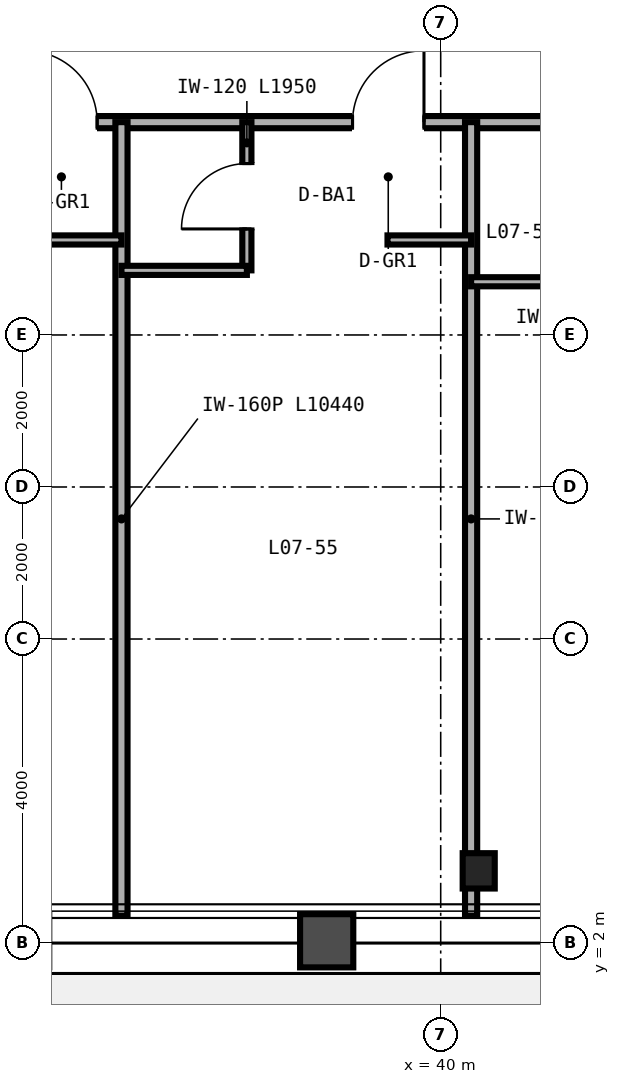
"""IFC4 building model, lengths in metres.
Left out: names, types, materials, properties, quantities, classifications, styles, units other than length and angle.
Written with IfcOpenShell. Run it as: python <this file> out.ifc"""

import sys

from ifc_helpers import new_model, si_unit, direction, frame, frame_2d, origin, origin_2d, place, context, subcontext, project, spatial, rectangle, i_section, extrude, source, transform, mapped, element, fill, save


model = new_model("IFC4")
c1 = context("Model", 3, precision=1e-05, world=origin(), true_north=direction((0.0, 1.0)))
c2 = subcontext(c1, "Body", "Model", "MODEL_VIEW")
j1 = project(units=[si_unit("LENGTHUNIT", "METRE"), si_unit("PLANEANGLEUNIT", "RADIAN")], contexts=[c1])
p1 = place(None, origin())
s1 = spatial("IfcSite", under=j1, at=p1, CompositionType="ELEMENT")
p2 = place(p1, origin())
s2 = spatial("IfcBuilding", under=s1, at=p2, CompositionType="ELEMENT")
p3 = place(p2, frame((0.0, 0.0, 34.8)))
s3 = spatial("IfcBuildingStorey", under=s2, at=p3, CompositionType="ELEMENT", Elevation=34.8)
m1 = source(origin(), c2, "Body", "SweptSolid", [
    extrude(i_section(OverallWidth=0.422, OverallDepth=0.465, WebThickness=0.045, FlangeThickness=0.073, FilletRadius=0.025, at=origin_2d()), origin(), (0.0, 0.0, 1.0), 3.35),
])
p4 = place(p3, frame((40.5, 2.95, 0.0), z_axis=(0.0, 0.0, 1.0), x_axis=(1.0, 0.0, 0.0)))
e1 = element("IfcColumn", 1, at=p4, inside=s3, PredefinedType="COLUMN", context=c2, shape_type="MappedRepresentation", body=[
    mapped(m1, transform((0.0, 0.0, 0.0), scale=1.0)),
])
p5 = place(p3, frame((14.0, 12.8, 0.0), z_axis=(0.0, 0.0, 1.0), x_axis=(1.0, 0.0, 0.0)))
e2 = element("IfcWall", 2, at=p5, inside=s3, PredefinedType="PARTITIONING", context=c2, shape_type="SweptSolid", body=[
    extrude(rectangle(XDim=36.0, YDim=0.16, at=frame_2d((18.0, 0.0))), origin(), (0.0, 0.0, 1.0), 2.571),
])
p6 = place(p5, frame((2.94, 0.0, 0.0)))
e3 = element("IfcOpeningElement", 3, at=p6, cuts=e2, PredefinedType="OPENING", context=c2, shape_type="SweptSolid", body=[
    extrude(rectangle(XDim=0.94, YDim=2.15, at=frame_2d((0.47, 1.075))), frame((0.0, 0.09, 0.0), z_axis=(0.0, -1.0, 0.0), x_axis=(1.0, 0.0, 0.0)), (0.0, 0.0, 1.0), 0.18),
])
p7 = place(p5, frame((7.14, 0.0, 0.0)))
e4 = element("IfcOpeningElement", 4, at=p7, cuts=e2, PredefinedType="OPENING", context=c2, shape_type="SweptSolid", body=[
    extrude(rectangle(XDim=0.94, YDim=2.15, at=frame_2d((0.47, 1.075))), frame((0.0, 0.09, 0.0), z_axis=(0.0, -1.0, 0.0), x_axis=(1.0, 0.0, 0.0)), (0.0, 0.0, 1.0), 0.18),
])
p8 = place(p5, frame((11.54, 0.0, 0.0)))
e5 = element("IfcOpeningElement", 5, at=p8, cuts=e2, PredefinedType="OPENING", context=c2, shape_type="SweptSolid", body=[
    extrude(rectangle(XDim=0.94, YDim=2.15, at=frame_2d((0.47, 1.075))), frame((0.0, 0.09, 0.0), z_axis=(0.0, -1.0, 0.0), x_axis=(1.0, 0.0, 0.0)), (0.0, 0.0, 1.0), 0.18),
])
p9 = place(p5, frame((15.94, 0.0, 0.0)))
e6 = element("IfcOpeningElement", 6, at=p9, cuts=e2, PredefinedType="OPENING", context=c2, shape_type="SweptSolid", body=[
    extrude(rectangle(XDim=0.94, YDim=2.15, at=frame_2d((0.47, 1.075))), frame((0.0, 0.09, 0.0), z_axis=(0.0, -1.0, 0.0), x_axis=(1.0, 0.0, 0.0)), (0.0, 0.0, 1.0), 0.18),
])
p10 = place(p5, frame((20.54, 0.0, 0.0)))
e7 = element("IfcOpeningElement", 7, at=p10, cuts=e2, PredefinedType="OPENING", context=c2, shape_type="SweptSolid", body=[
    extrude(rectangle(XDim=0.94, YDim=2.15, at=frame_2d((0.47, 1.075))), frame((0.0, 0.09, 0.0), z_axis=(0.0, -1.0, 0.0), x_axis=(1.0, 0.0, 0.0)), (0.0, 0.0, 1.0), 0.18),
])
p11 = place(p5, frame((24.84, 0.0, 0.0)))
e8 = element("IfcOpeningElement", 8, at=p11, cuts=e2, PredefinedType="OPENING", context=c2, shape_type="SweptSolid", body=[
    extrude(rectangle(XDim=0.94, YDim=2.15, at=frame_2d((0.47, 1.075))), frame((0.0, 0.09, 0.0), z_axis=(0.0, -1.0, 0.0), x_axis=(1.0, 0.0, 0.0)), (0.0, 0.0, 1.0), 0.18),
])
p12 = place(p5, frame((29.94, 0.0, 0.0)))
e9 = element("IfcOpeningElement", 9, at=p12, cuts=e2, PredefinedType="OPENING", context=c2, shape_type="SweptSolid", body=[
    extrude(rectangle(XDim=0.94, YDim=2.15, at=frame_2d((0.47, 1.075))), frame((0.0, 0.09, 0.0), z_axis=(0.0, -1.0, 0.0), x_axis=(1.0, 0.0, 0.0)), (0.0, 0.0, 1.0), 0.18),
])
p13 = place(p5, frame((34.74, 0.0, 0.0)))
e10 = element("IfcOpeningElement", 10, at=p13, cuts=e2, PredefinedType="OPENING", context=c2, shape_type="SweptSolid", body=[
    extrude(rectangle(XDim=0.94, YDim=2.15, at=frame_2d((0.47, 1.075))), frame((0.0, 0.09, 0.0), z_axis=(0.0, -1.0, 0.0), x_axis=(1.0, 0.0, 0.0)), (0.0, 0.0, 1.0), 0.18),
])
p14 = place(p3, frame((35.8, 2.36, 0.0), z_axis=(0.0, 0.0, 1.0), x_axis=(0.0, 1.0, 0.0)))
e11 = element("IfcWall", 11, at=p14, inside=s3, PredefinedType="PARTITIONING", context=c2, shape_type="SweptSolid", body=[
    extrude(rectangle(XDim=10.44, YDim=0.16, at=frame_2d((5.22, 0.0))), origin(), (0.0, 0.0, 1.0), 2.423),
])
p15 = place(p3, frame((34.7, 11.25, 0.0), z_axis=(0.0, 0.0, 1.0), x_axis=(1.0, 0.0, 0.0)))
e12 = element("IfcWall", 12, at=p15, inside=s3, PredefinedType="PARTITIONING", context=c2, shape_type="SweptSolid", body=[
    extrude(rectangle(XDim=1.1, YDim=0.12, at=frame_2d((0.55, 0.0))), origin(), (0.0, 0.0, 1.0), 3.35),
])
p16 = place(p3, frame((40.4, 2.36, 0.0), z_axis=(0.0, 0.0, 1.0), x_axis=(0.0, 1.0, 0.0)))
e13 = element("IfcWall", 13, at=p16, inside=s3, PredefinedType="PARTITIONING", context=c2, shape_type="SweptSolid", body=[
    extrude(rectangle(XDim=10.44, YDim=0.16, at=frame_2d((5.22, 0.0))), origin(), (0.0, 0.0, 1.0), 2.423),
])
p17 = place(p3, frame((37.45, 10.85, 0.0), z_axis=(0.0, 0.0, 1.0), x_axis=(0.0, 1.0, 0.0)))
e14 = element("IfcWall", 14, at=p17, inside=s3, PredefinedType="PARTITIONING", context=c2, shape_type="SweptSolid", body=[
    extrude(rectangle(XDim=1.95, YDim=0.12, at=frame_2d((0.975, 0.0))), origin(), (0.0, 0.0, 1.0), 3.35),
])
p18 = place(p17, frame((0.545, 0.0, 0.0)))
e15 = element("IfcOpeningElement", 15, at=p18, cuts=e14, PredefinedType="OPENING", context=c2, shape_type="SweptSolid", body=[
    extrude(rectangle(XDim=0.86, YDim=2.1, at=frame_2d((0.43, 1.05))), frame((0.0, 0.07, 0.0), z_axis=(0.0, -1.0, 0.0), x_axis=(1.0, 0.0, 0.0)), (0.0, 0.0, 1.0), 0.14),
])
p19 = place(p3, frame((35.8, 10.85, 0.0), z_axis=(0.0, 0.0, 1.0), x_axis=(1.0, 0.0, 0.0)))
e16 = element("IfcWall", 16, at=p19, inside=s3, PredefinedType="PARTITIONING", context=c2, shape_type="SweptSolid", body=[
    extrude(rectangle(XDim=1.65, YDim=0.12, at=frame_2d((0.825, 0.0))), origin(), (0.0, 0.0, 1.0), 3.35),
])
p20 = place(p3, frame((39.3, 11.25, 0.0), z_axis=(0.0, 0.0, 1.0), x_axis=(1.0, 0.0, 0.0)))
e17 = element("IfcWall", 17, at=p20, inside=s3, PredefinedType="PARTITIONING", context=c2, shape_type="SweptSolid", body=[
    extrude(rectangle(XDim=1.1, YDim=0.12, at=frame_2d((0.55, 0.0))), origin(), (0.0, 0.0, 1.0), 2.571),
])
p21 = place(p3, frame((40.4, 10.7, 0.0), z_axis=(0.0, 0.0, 1.0), x_axis=(1.0, 0.0, 0.0)))
e18 = element("IfcWall", 18, at=p21, inside=s3, PredefinedType="PARTITIONING", context=c2, shape_type="SweptSolid", body=[
    extrude(rectangle(XDim=2.05, YDim=0.12, at=frame_2d((1.025, 0.0))), origin(), (0.0, 0.0, 1.0), 2.571),
])
m2 = source(origin(), c2, "Body", "SweptSolid", [
    extrude(rectangle(XDim=0.86, YDim=2.1, at=frame_2d((0.43, 1.05))), frame((0.0, 0.025, 0.0), z_axis=(0.0, -1.0, 0.0), x_axis=(1.0, 0.0, 0.0)), (0.0, 0.0, 1.0), 0.05),
])
p22 = place(p18, origin())
e19 = element("IfcDoor", 19, at=p22, inside=s3, OperationType="SINGLE_SWING_LEFT", PredefinedType="DOOR", context=c2, shape_type="MappedRepresentation", body=[
    mapped(m2, transform((0.0, 0.0, 0.0), scale=1.0)),
])
fill(e15, e19)
m3 = source(origin(), c2, "Body", "SweptSolid", [
    extrude(rectangle(XDim=0.94, YDim=2.15, at=frame_2d((0.47, 1.075))), frame((0.0, 0.025, 0.0), z_axis=(0.0, -1.0, 0.0), x_axis=(1.0, 0.0, 0.0)), (0.0, 0.0, 1.0), 0.05),
])
p23 = place(p10, origin())
e20 = element("IfcDoor", 20, at=p23, inside=s3, OperationType="SINGLE_SWING_LEFT", PredefinedType="DOOR", context=c2, shape_type="MappedRepresentation", body=[
    mapped(m3, transform((0.0, 0.0, 0.0), scale=1.0)),
])
fill(e7, e20)
p24 = place(p11, origin())
e21 = element("IfcDoor", 21, at=p24, inside=s3, OperationType="SINGLE_SWING_RIGHT", PredefinedType="DOOR", context=c2, shape_type="MappedRepresentation", body=[
    mapped(m3, transform((0.0, 0.0, 0.0), scale=1.0)),
])
fill(e8, e21)
save(model, sys.argv[1])
